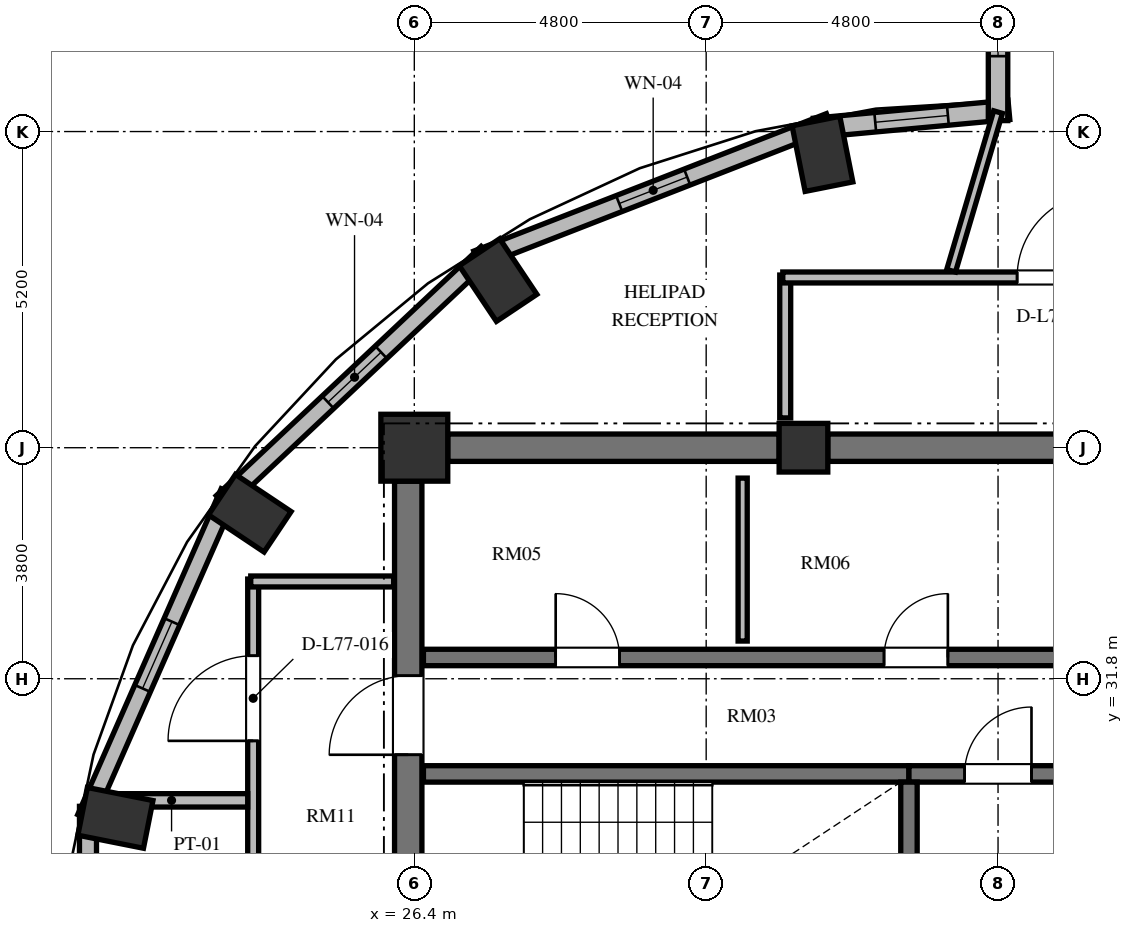
"""IFC4 building model, lengths in metres.
Left out: names, types, materials, properties, quantities, classifications, styles, units other than length and angle.
Written with IfcOpenShell. Run it as: python <this file> out.ifc"""

import sys

from ifc_helpers import new_model, si_unit, direction, frame, frame_2d, origin, origin_2d, place, context, subcontext, project, spatial, rectangle, extrude, element, fill, save


model = new_model("IFC4")
c1 = context("Model", 3, precision=1e-05, world=origin(), true_north=direction((0.0, 1.0)))
c2 = subcontext(c1, "Body", "Model", "MODEL_VIEW")
j1 = project(units=[si_unit("LENGTHUNIT", "METRE"), si_unit("PLANEANGLEUNIT", "RADIAN")], contexts=[c1])
p1 = place(None, origin())
s1 = spatial("IfcSite", under=j1, at=p1, CompositionType="ELEMENT")
p2 = place(p1, origin())
s2 = spatial("IfcBuilding", under=s1, at=p2, CompositionType="ELEMENT")
p3 = place(p2, frame((0.0, 0.0, 295.152)))
s3 = spatial("IfcBuildingStorey", under=s2, at=p3, CompositionType="ELEMENT", Elevation=295.152)
for number, where, z_axis, x_axis in (
    (1, (33.113, 40.433, 0.0), (0.0, 0.0, 1.0), (-0.195, 0.981, 0.0)),
    (2, (27.778, 38.357, 0.0), (0.0, 0.0, 1.0), (-0.556, 0.831, 0.0)),
    (3, (23.694, 34.522, 0.0), (0.0, 0.0, 1.0), (-0.831, 0.556, 0.0)),
    (4, (21.484, 29.512, 0.0), (0.0, 0.0, 1.0), (-0.981, 0.195, 0.0)),
):
    element("IfcColumn", number, at=place(p3, frame(where, z_axis=z_axis, x_axis=x_axis)), inside=s3, PredefinedType="COLUMN", context=c2, shape_type="SweptSolid", body=[
        extrude(rectangle(XDim=1.1, YDim=0.8, at=origin_2d()), origin(), (0.0, 0.0, 1.0), 3.648),
    ])
p4 = place(p3, frame((32.8, 35.6, 0.0), z_axis=(0.0, 0.0, 1.0), x_axis=(1.0, 0.0, 0.0)))
e5 = element("IfcColumn", 5, at=p4, inside=s3, PredefinedType="COLUMN", context=c2, shape_type="SweptSolid", body=[
    extrude(rectangle(XDim=0.8, YDim=0.8, at=origin_2d()), origin(), (0.0, 0.0, 1.0), 3.648),
])
p5 = place(p3, frame((26.4, 35.6, 0.0), z_axis=(0.0, 0.0, 1.0), x_axis=(1.0, 0.0, 0.0)))
e6 = element("IfcColumn", 6, at=p5, inside=s3, PredefinedType="COLUMN", context=c2, shape_type="SweptSolid", body=[
    extrude(rectangle(XDim=1.1, YDim=1.1, at=origin_2d()), origin(), (0.0, 0.0, 1.0), 3.648),
])
p6 = place(p3, frame((26.3, 20.95, 0.0), z_axis=(0.0, 0.0, 1.0), x_axis=(0.0, 1.0, 0.0)))
e7 = element("IfcWall", 7, at=p6, inside=s3, PredefinedType="SHEAR", context=c2, shape_type="SweptSolid", body=[
    extrude(rectangle(XDim=14.1, YDim=0.45, at=frame_2d((7.05, 0.0))), origin(), (0.0, 0.0, 1.0), 3.648),
])
p7 = place(p6, frame((6.5, 0.0, 0.0)))
e8 = element("IfcOpeningElement", 8, at=p7, cuts=e7, PredefinedType="OPENING", context=c2, shape_type="SweptSolid", body=[
    extrude(rectangle(XDim=1.2, YDim=2.15, at=frame_2d((0.6, 1.075))), frame((0.0, 0.235, 0.0), z_axis=(0.0, -1.0, 0.0), x_axis=(1.0, 0.0, 0.0)), (0.0, 0.0, 1.0), 0.47),
])
p8 = place(p6, frame((9.6, 0.0, 0.0)))
e9 = element("IfcOpeningElement", 9, at=p8, cuts=e7, PredefinedType="OPENING", context=c2, shape_type="SweptSolid", body=[
    extrude(rectangle(XDim=1.3, YDim=2.2, at=frame_2d((0.65, 1.1))), frame((0.0, 0.235, 0.0), z_axis=(0.0, -1.0, 0.0), x_axis=(1.0, 0.0, 0.0)), (0.0, 0.0, 1.0), 0.47),
])
p9 = place(p6, frame((3.26, 0.0, 0.0)))
e10 = element("IfcOpeningElement", 10, at=p9, cuts=e7, PredefinedType="OPENING", context=c2, shape_type="SweptSolid", body=[
    extrude(rectangle(XDim=1.3, YDim=2.2, at=frame_2d((0.65, 1.1))), frame((0.0, 0.235, 0.0), z_axis=(0.0, -1.0, 0.0), x_axis=(1.0, 0.0, 0.0)), (0.0, 0.0, 1.0), 0.47),
])
p10 = place(p3, frame((26.95, 35.6, 0.0), z_axis=(0.0, 0.0, 1.0), x_axis=(1.0, 0.0, 0.0)))
e11 = element("IfcWall", 11, at=p10, inside=s3, PredefinedType="SHEAR", context=c2, shape_type="SweptSolid", body=[
    extrude(rectangle(XDim=5.45, YDim=0.45, at=frame_2d((2.725, 0.0))), origin(), (0.0, 0.0, 1.0), 3.648),
])
p11 = place(p3, frame((33.2, 35.6, 0.0), z_axis=(0.0, 0.0, 1.0), x_axis=(1.0, 0.0, 0.0)))
e12 = element("IfcWall", 12, at=p11, inside=s3, PredefinedType="SHEAR", context=c2, shape_type="SweptSolid", body=[
    extrude(rectangle(XDim=5.6, YDim=0.45, at=frame_2d((2.8, 0.0))), origin(), (0.0, 0.0, 1.0), 3.648),
])
p12 = place(p3, frame((33.228, 40.964, 0.0), z_axis=(0.0, 0.0, 1.0), x_axis=(-0.931716550814, -0.36318627306, 0.0)))
e13 = element("IfcWall", 13, at=p12, inside=s3, PredefinedType="SOLIDWALL", context=c2, shape_type="SweptSolid", body=[
    extrude(rectangle(XDim=6.224, YDim=0.28, at=frame_2d((3.112, 0.0))), origin(), (0.0, 0.0, 1.0), 3.448),
])
p13 = place(p12, frame((2.512, 0.0, 0.85)))
e14 = element("IfcOpeningElement", 14, at=p13, cuts=e13, PredefinedType="OPENING", context=c2, shape_type="SweptSolid", body=[
    extrude(rectangle(XDim=1.2, YDim=1.8, at=frame_2d((0.6, 0.9))), frame((0.0, 0.15, 0.0), z_axis=(0.0, -1.0, 0.0), x_axis=(1.0, 0.0, 0.0)), (0.0, 0.0, 1.0), 0.3),
])
p14 = place(p3, frame((27.595, 38.808, 0.0), z_axis=(0.0, 0.0, 1.0), x_axis=(-0.728251519923, -0.685309947199, 0.0)))
e15 = element("IfcWall", 15, at=p14, inside=s3, PredefinedType="SOLIDWALL", context=c2, shape_type="SweptSolid", body=[
    extrude(rectangle(XDim=5.981, YDim=0.28, at=frame_2d((2.99, 0.0))), origin(), (0.0, 0.0, 1.0), 3.448),
])
p15 = place(p14, frame((2.391, 0.0, 0.85)))
e16 = element("IfcOpeningElement", 16, at=p15, cuts=e15, PredefinedType="OPENING", context=c2, shape_type="SweptSolid", body=[
    extrude(rectangle(XDim=1.2, YDim=1.8, at=frame_2d((0.6, 0.9))), frame((0.0, 0.15, 0.0), z_axis=(0.0, -1.0, 0.0), x_axis=(1.0, 0.0, 0.0)), (0.0, 0.0, 1.0), 0.3),
])
p16 = place(p3, frame((23.352, 34.869, 0.0), z_axis=(0.0, 0.0, 1.0), x_axis=(-0.402882523888, -0.915251698685, 0.0)))
e17 = element("IfcWall", 17, at=p16, inside=s3, PredefinedType="SOLIDWALL", context=c2, shape_type="SweptSolid", body=[
    extrude(rectangle(XDim=5.856, YDim=0.28, at=frame_2d((2.928, 0.0))), origin(), (0.0, 0.0, 1.0), 3.448),
])
p17 = place(p16, frame((2.328, 0.0, 0.85)))
e18 = element("IfcOpeningElement", 18, at=p17, cuts=e17, PredefinedType="OPENING", context=c2, shape_type="SweptSolid", body=[
    extrude(rectangle(XDim=1.2, YDim=1.8, at=frame_2d((0.6, 0.9))), frame((0.0, 0.15, 0.0), z_axis=(0.0, -1.0, 0.0), x_axis=(1.0, 0.0, 0.0)), (0.0, 0.0, 1.0), 0.3),
])
p18 = place(p3, frame((21.033, 29.701, 0.0), z_axis=(0.0, 0.0, 1.0), x_axis=(0.0, -1.0, 0.0)))
e19 = element("IfcWall", 19, at=p18, inside=s3, PredefinedType="SOLIDWALL", context=c2, shape_type="SweptSolid", body=[
    extrude(rectangle(XDim=5.803, YDim=0.28, at=frame_2d((2.901, 0.0))), origin(), (0.0, 0.0, 1.0), 3.448),
])
p19 = place(p18, frame((2.302, 0.0, 0.85)))
e20 = element("IfcOpeningElement", 20, at=p19, cuts=e19, PredefinedType="OPENING", context=c2, shape_type="SweptSolid", body=[
    extrude(rectangle(XDim=1.2, YDim=1.8, at=frame_2d((0.6, 0.9))), frame((0.0, 0.15, 0.0), z_axis=(0.0, -1.0, 0.0), x_axis=(1.0, 0.0, 0.0)), (0.0, 0.0, 1.0), 0.3),
])
p20 = place(p3, frame((36.179, 41.156, 0.0), z_axis=(0.0, 0.0, 1.0), x_axis=(-0.995736155144, -0.092247001792, 0.0)))
e21 = element("IfcWall", 21, at=p20, inside=s3, PredefinedType="SOLIDWALL", context=c2, shape_type="SweptSolid", body=[
    extrude(rectangle(XDim=3.216, YDim=0.32, at=frame_2d((1.608, 0.0))), origin(), (0.0, 0.0, 1.0), 3.448),
])
p21 = place(p20, frame((1.008, 0.0, 0.85)))
e22 = element("IfcOpeningElement", 22, at=p21, cuts=e21, PredefinedType="OPENING", context=c2, shape_type="SweptSolid", body=[
    extrude(rectangle(XDim=1.2, YDim=1.8, at=frame_2d((0.6, 0.9))), frame((0.0, 0.17, 0.0), z_axis=(0.0, -1.0, 0.0), x_axis=(1.0, 0.0, 0.0)), (0.0, 0.0, 1.0), 0.34),
])
p22 = place(p3, frame((36.0, 45.5, 0.0), z_axis=(0.0, 0.0, 1.0), x_axis=(0.0, -1.0, 0.0)))
e23 = element("IfcWall", 23, at=p22, inside=s3, PredefinedType="SOLIDWALL", context=c2, shape_type="SweptSolid", body=[
    extrude(rectangle(XDim=4.52, YDim=0.32, at=frame_2d((2.26, 0.0))), origin(), (0.0, 0.0, 1.0), 3.448),
])
p23 = place(p22, frame((1.06, 0.0, 0.84)))
e24 = element("IfcOpeningElement", 24, at=p23, cuts=e23, PredefinedType="OPENING", context=c2, shape_type="SweptSolid", body=[
    extrude(rectangle(XDim=2.4, YDim=2.04, at=frame_2d((1.2, 1.02))), frame((0.0, 0.17, 0.0), z_axis=(0.0, -1.0, 0.0), x_axis=(1.0, 0.0, 0.0)), (0.0, 0.0, 1.0), 0.34),
])
p24 = place(p3, frame((26.55, 30.235, 0.0), z_axis=(0.0, 0.0, 1.0), x_axis=(1.0, 0.0, 0.0)))
e25 = element("IfcWall", 25, at=p24, inside=s3, PredefinedType="SHEAR", context=c2, shape_type="SweptSolid", body=[
    extrude(rectangle(XDim=7.985, YDim=0.27, at=frame_2d((3.992, 0.0))), origin(), (0.0, 0.0, 1.0), 3.648),
])
p25 = place(p3, frame((34.535, 30.235, 0.0), z_axis=(0.0, 0.0, 1.0), x_axis=(1.0, 0.0, 0.0)))
e26 = element("IfcWall", 26, at=p25, inside=s3, PredefinedType="SHEAR", context=c2, shape_type="SweptSolid", body=[
    extrude(rectangle(XDim=2.93, YDim=0.27, at=frame_2d((1.465, 0.0))), origin(), (0.0, 0.0, 1.0), 3.648),
])
p26 = place(p25, frame((0.915, 0.0, 0.0)))
e27 = element("IfcOpeningElement", 27, at=p26, cuts=e26, PredefinedType="OPENING", context=c2, shape_type="SweptSolid", body=[
    extrude(rectangle(XDim=1.1, YDim=2.15, at=frame_2d((0.55, 1.075))), frame((0.0, 0.145, 0.0), z_axis=(0.0, -1.0, 0.0), x_axis=(1.0, 0.0, 0.0)), (0.0, 0.0, 1.0), 0.29),
])
p27 = place(p3, frame((34.535, 26.02, 0.0), z_axis=(0.0, 0.0, 1.0), x_axis=(0.0, 1.0, 0.0)))
e28 = element("IfcWall", 28, at=p27, inside=s3, PredefinedType="SHEAR", context=c2, shape_type="SweptSolid", body=[
    extrude(rectangle(XDim=4.08, YDim=0.27, at=frame_2d((2.04, 0.0))), origin(), (0.0, 0.0, 1.0), 3.648),
])
p28 = place(p3, frame((26.55, 32.15, 0.0), z_axis=(0.0, 0.0, 1.0), x_axis=(1.0, 0.0, 0.0)))
e29 = element("IfcWall", 29, at=p28, inside=s3, PredefinedType="SHEAR", context=c2, shape_type="SweptSolid", body=[
    extrude(rectangle(XDim=16.4, YDim=0.27, at=frame_2d((8.2, 0.0))), origin(), (0.0, 0.0, 1.0), 3.648),
])
p29 = place(p28, frame((2.175, 0.0, 0.0)))
e30 = element("IfcOpeningElement", 30, at=p29, cuts=e29, PredefinedType="OPENING", context=c2, shape_type="SweptSolid", body=[
    extrude(rectangle(XDim=1.05, YDim=2.15, at=frame_2d((0.525, 1.075))), frame((0.0, 0.145, 0.0), z_axis=(0.0, -1.0, 0.0), x_axis=(1.0, 0.0, 0.0)), (0.0, 0.0, 1.0), 0.29),
])
p30 = place(p28, frame((7.575, 0.0, 0.0)))
e31 = element("IfcOpeningElement", 31, at=p30, cuts=e29, PredefinedType="OPENING", context=c2, shape_type="SweptSolid", body=[
    extrude(rectangle(XDim=1.05, YDim=2.15, at=frame_2d((0.525, 1.075))), frame((0.0, 0.145, 0.0), z_axis=(0.0, -1.0, 0.0), x_axis=(1.0, 0.0, 0.0)), (0.0, 0.0, 1.0), 0.29),
])
p31 = place(p28, frame((11.9, 0.0, 0.0)))
e32 = element("IfcOpeningElement", 32, at=p31, cuts=e29, PredefinedType="OPENING", context=c2, shape_type="SweptSolid", body=[
    extrude(rectangle(XDim=1.1, YDim=2.2, at=frame_2d((0.55, 1.1))), frame((0.0, 0.145, 0.0), z_axis=(0.0, -1.0, 0.0), x_axis=(1.0, 0.0, 0.0)), (0.0, 0.0, 1.0), 0.29),
])
p32 = place(p28, frame((14.5, 0.0, 0.0)))
e33 = element("IfcOpeningElement", 33, at=p32, cuts=e29, PredefinedType="OPENING", context=c2, shape_type="SweptSolid", body=[
    extrude(rectangle(XDim=1.1, YDim=2.2, at=frame_2d((0.55, 1.1))), frame((0.0, 0.145, 0.0), z_axis=(0.0, -1.0, 0.0), x_axis=(1.0, 0.0, 0.0)), (0.0, 0.0, 1.0), 0.29),
])
p33 = place(p3, frame((31.8, 32.42, 0.0), z_axis=(0.0, 0.0, 1.0), x_axis=(0.0, 1.0, 0.0)))
e34 = element("IfcWall", 34, at=p33, inside=s3, PredefinedType="PARTITIONING", context=c2, shape_type="SweptSolid", body=[
    extrude(rectangle(XDim=2.68, YDim=0.15, at=frame_2d((1.34, 0.0))), origin(), (0.0, 0.0, 1.0), 3.448),
])
p34 = place(p3, frame((32.5, 36.09, 0.0), z_axis=(0.0, 0.0, 1.0), x_axis=(0.0, 1.0, 0.0)))
e35 = element("IfcWall", 35, at=p34, inside=s3, PredefinedType="PARTITIONING", context=c2, shape_type="SweptSolid", body=[
    extrude(rectangle(XDim=2.35, YDim=0.18, at=frame_2d((1.175, 0.0))), origin(), (0.0, 0.0, 1.0), 3.448),
])
p35 = place(p3, frame((32.46, 38.4, 0.0), z_axis=(0.0, 0.0, 1.0), x_axis=(1.0, 0.0, 0.0)))
e36 = element("IfcWall", 36, at=p35, inside=s3, PredefinedType="PARTITIONING", context=c2, shape_type="SweptSolid", body=[
    extrude(rectangle(XDim=19.879, YDim=0.18, at=frame_2d((9.939, 0.0))), origin(), (0.0, 0.0, 1.0), 3.073),
])
p36 = place(p35, frame((14.59, 0.0, 0.0)))
e37 = element("IfcOpeningElement", 37, at=p36, cuts=e36, PredefinedType="OPENING", context=c2, shape_type="SweptSolid", body=[
    extrude(rectangle(XDim=1.4, YDim=2.2, at=frame_2d((0.7, 1.1))), frame((0.0, 0.1, 0.0), z_axis=(0.0, -1.0, 0.0), x_axis=(1.0, 0.0, 0.0)), (0.0, 0.0, 1.0), 0.2),
])
p37 = place(p35, frame((11.215, 0.0, 0.0)))
e38 = element("IfcOpeningElement", 38, at=p37, cuts=e36, PredefinedType="OPENING", context=c2, shape_type="SweptSolid", body=[
    extrude(rectangle(XDim=1.05, YDim=2.15, at=frame_2d((0.525, 1.075))), frame((0.0, 0.1, 0.0), z_axis=(0.0, -1.0, 0.0), x_axis=(1.0, 0.0, 0.0)), (0.0, 0.0, 1.0), 0.2),
])
p38 = place(p35, frame((7.44, 0.0, 0.0)))
e39 = element("IfcOpeningElement", 39, at=p38, cuts=e36, PredefinedType="OPENING", context=c2, shape_type="SweptSolid", body=[
    extrude(rectangle(XDim=1.4, YDim=2.2, at=frame_2d((0.7, 1.1))), frame((0.0, 0.1, 0.0), z_axis=(0.0, -1.0, 0.0), x_axis=(1.0, 0.0, 0.0)), (0.0, 0.0, 1.0), 0.2),
])
p39 = place(p35, frame((3.854, 0.0, 0.0)))
e40 = element("IfcOpeningElement", 40, at=p39, cuts=e36, PredefinedType="OPENING", context=c2, shape_type="SweptSolid", body=[
    extrude(rectangle(XDim=1.4, YDim=2.2, at=frame_2d((0.7, 1.1))), frame((0.0, 0.1, 0.0), z_axis=(0.0, -1.0, 0.0), x_axis=(1.0, 0.0, 0.0)), (0.0, 0.0, 1.0), 0.2),
])
p40 = place(p3, frame((23.75, 22.16, 0.0), z_axis=(0.0, 0.0, 1.0), x_axis=(0.0, 1.0, 0.0)))
e41 = element("IfcWall", 41, at=p40, inside=s3, PredefinedType="PARTITIONING", context=c2, shape_type="SweptSolid", body=[
    extrude(rectangle(XDim=11.28, YDim=0.18, at=frame_2d((5.64, 0.0))), origin(), (0.0, 0.0, 1.0), 3.448),
])
p41 = place(p40, frame((4.772, 0.0, 0.0)))
e42 = element("IfcOpeningElement", 42, at=p41, cuts=e41, PredefinedType="OPENING", context=c2, shape_type="SweptSolid", body=[
    extrude(rectangle(XDim=1.4, YDim=2.2, at=frame_2d((0.7, 1.1))), frame((0.0, 0.1, 0.0), z_axis=(0.0, -1.0, 0.0), x_axis=(1.0, 0.0, 0.0)), (0.0, 0.0, 1.0), 0.2),
])
p42 = place(p40, frame((8.618, 0.0, 0.0)))
e43 = element("IfcOpeningElement", 43, at=p42, cuts=e41, PredefinedType="OPENING", context=c2, shape_type="SweptSolid", body=[
    extrude(rectangle(XDim=1.4, YDim=2.2, at=frame_2d((0.7, 1.1))), frame((0.0, 0.1, 0.0), z_axis=(0.0, -1.0, 0.0), x_axis=(1.0, 0.0, 0.0)), (0.0, 0.0, 1.0), 0.2),
])
p43 = place(p3, frame((23.71, 33.4, 0.0), z_axis=(0.0, 0.0, 1.0), x_axis=(1.0, 0.0, 0.0)))
e44 = element("IfcWall", 44, at=p43, inside=s3, PredefinedType="PARTITIONING", context=c2, shape_type="SweptSolid", body=[
    extrude(rectangle(XDim=2.35, YDim=0.18, at=frame_2d((1.175, 0.0))), origin(), (0.0, 0.0, 1.0), 3.448),
])
p44 = place(p3, frame((21.156, 29.8, 0.0), z_axis=(0.0, 0.0, 1.0), x_axis=(1.0, 0.0, 0.0)))
e45 = element("IfcWall", 45, at=p44, inside=s3, PredefinedType="PARTITIONING", context=c2, shape_type="SweptSolid", body=[
    extrude(rectangle(XDim=2.504, YDim=0.22, at=frame_2d((1.252, 0.0))), origin(), (0.0, 0.0, 1.0), 3.448),
])
p45 = place(p3, frame((35.229, 38.511, 0.0), z_axis=(0.0, 0.0, 1.0), x_axis=(0.28355057677, 0.958957282893, 0.0)))
e46 = element("IfcWall", 46, at=p45, inside=s3, PredefinedType="PARTITIONING", context=c2, shape_type="SweptSolid", body=[
    extrude(rectangle(XDim=2.721, YDim=0.15, at=frame_2d((1.36, 0.0))), origin(), (0.0, 0.0, 1.0), 3.448),
])
p46 = place(p13, origin())
e47 = element("IfcWindow", 47, at=p46, inside=s3, PartitioningType="SINGLE_PANEL", PredefinedType="WINDOW", context=c2, shape_type="SweptSolid", body=[
    extrude(rectangle(XDim=1.2, YDim=1.8, at=frame_2d((0.6, 0.9))), frame((0.0, 0.03, 0.0), z_axis=(0.0, -1.0, 0.0), x_axis=(1.0, 0.0, 0.0)), (0.0, 0.0, 1.0), 0.06),
])
fill(e14, e47)
p47 = place(p15, origin())
e48 = element("IfcWindow", 48, at=p47, inside=s3, PartitioningType="SINGLE_PANEL", PredefinedType="WINDOW", context=c2, shape_type="SweptSolid", body=[
    extrude(rectangle(XDim=1.2, YDim=1.8, at=frame_2d((0.6, 0.9))), frame((0.0, 0.03, 0.0), z_axis=(0.0, -1.0, 0.0), x_axis=(1.0, 0.0, 0.0)), (0.0, 0.0, 1.0), 0.06),
])
fill(e16, e48)
p48 = place(p17, origin())
e49 = element("IfcWindow", 49, at=p48, inside=s3, PartitioningType="SINGLE_PANEL", PredefinedType="WINDOW", context=c2, shape_type="SweptSolid", body=[
    extrude(rectangle(XDim=1.2, YDim=1.8, at=frame_2d((0.6, 0.9))), frame((0.0, 0.03, 0.0), z_axis=(0.0, -1.0, 0.0), x_axis=(1.0, 0.0, 0.0)), (0.0, 0.0, 1.0), 0.06),
])
fill(e18, e49)
p49 = place(p21, origin())
e50 = element("IfcWindow", 50, at=p49, inside=s3, PartitioningType="SINGLE_PANEL", PredefinedType="WINDOW", context=c2, shape_type="SweptSolid", body=[
    extrude(rectangle(XDim=1.2, YDim=1.8, at=frame_2d((0.6, 0.9))), frame((0.0, 0.03, 0.0), z_axis=(0.0, -1.0, 0.0), x_axis=(1.0, 0.0, 0.0)), (0.0, 0.0, 1.0), 0.06),
])
fill(e22, e50)
p50 = place(p23, origin())
e51 = element("IfcWindow", 51, at=p50, inside=s3, PartitioningType="SINGLE_PANEL", PredefinedType="WINDOW", context=c2, shape_type="SweptSolid", body=[
    extrude(rectangle(XDim=2.4, YDim=2.04, at=frame_2d((1.2, 1.02))), frame((0.0, 0.03, 0.0), z_axis=(0.0, -1.0, 0.0), x_axis=(1.0, 0.0, 0.0)), (0.0, 0.0, 1.0), 0.06),
])
fill(e24, e51)
p51 = place(p26, origin())
e52 = element("IfcDoor", 52, at=p51, inside=s3, OperationType="SINGLE_SWING_RIGHT", PredefinedType="DOOR", context=c2, shape_type="SweptSolid", body=[
    extrude(rectangle(XDim=1.1, YDim=2.15, at=frame_2d((0.55, 1.075))), frame((0.0, 0.025, 0.0), z_axis=(0.0, -1.0, 0.0), x_axis=(1.0, 0.0, 0.0)), (0.0, 0.0, 1.0), 0.05),
])
fill(e27, e52)
p52 = place(p8, origin())
e53 = element("IfcDoor", 53, at=p52, inside=s3, OperationType="SINGLE_SWING_LEFT", PredefinedType="DOOR", context=c2, shape_type="SweptSolid", body=[
    extrude(rectangle(XDim=1.3, YDim=2.2, at=frame_2d((0.65, 1.1))), frame((0.0, 0.025, 0.0), z_axis=(0.0, -1.0, 0.0), x_axis=(1.0, 0.0, 0.0)), (0.0, 0.0, 1.0), 0.05),
])
fill(e9, e53)
p53 = place(p29, origin())
e54 = element("IfcDoor", 54, at=p53, inside=s3, OperationType="SINGLE_SWING_LEFT", PredefinedType="DOOR", context=c2, shape_type="SweptSolid", body=[
    extrude(rectangle(XDim=1.05, YDim=2.15, at=frame_2d((0.525, 1.075))), frame((0.0, 0.025, 0.0), z_axis=(0.0, -1.0, 0.0), x_axis=(1.0, 0.0, 0.0)), (0.0, 0.0, 1.0), 0.05),
])
fill(e30, e54)
p54 = place(p30, origin())
e55 = element("IfcDoor", 55, at=p54, inside=s3, OperationType="SINGLE_SWING_RIGHT", PredefinedType="DOOR", context=c2, shape_type="SweptSolid", body=[
    extrude(rectangle(XDim=1.05, YDim=2.15, at=frame_2d((0.525, 1.075))), frame((0.0, 0.025, 0.0), z_axis=(0.0, -1.0, 0.0), x_axis=(1.0, 0.0, 0.0)), (0.0, 0.0, 1.0), 0.05),
])
fill(e31, e55)
p55 = place(p39, origin())
e56 = element("IfcDoor", 56, at=p55, inside=s3, OperationType="SINGLE_SWING_RIGHT", PredefinedType="DOOR", context=c2, shape_type="SweptSolid", body=[
    extrude(rectangle(XDim=1.4, YDim=2.2, at=frame_2d((0.7, 1.1))), frame((0.0, 0.025, 0.0), z_axis=(0.0, -1.0, 0.0), x_axis=(1.0, 0.0, 0.0)), (0.0, 0.0, 1.0), 0.05),
])
fill(e40, e56)
p56 = place(p42, origin())
e57 = element("IfcDoor", 57, at=p56, inside=s3, OperationType="SINGLE_SWING_LEFT", PredefinedType="DOOR", context=c2, shape_type="SweptSolid", body=[
    extrude(rectangle(XDim=1.4, YDim=2.2, at=frame_2d((0.7, 1.1))), frame((0.0, 0.025, 0.0), z_axis=(0.0, -1.0, 0.0), x_axis=(1.0, 0.0, 0.0)), (0.0, 0.0, 1.0), 0.05),
])
fill(e43, e57)
save(model, sys.argv[1])
